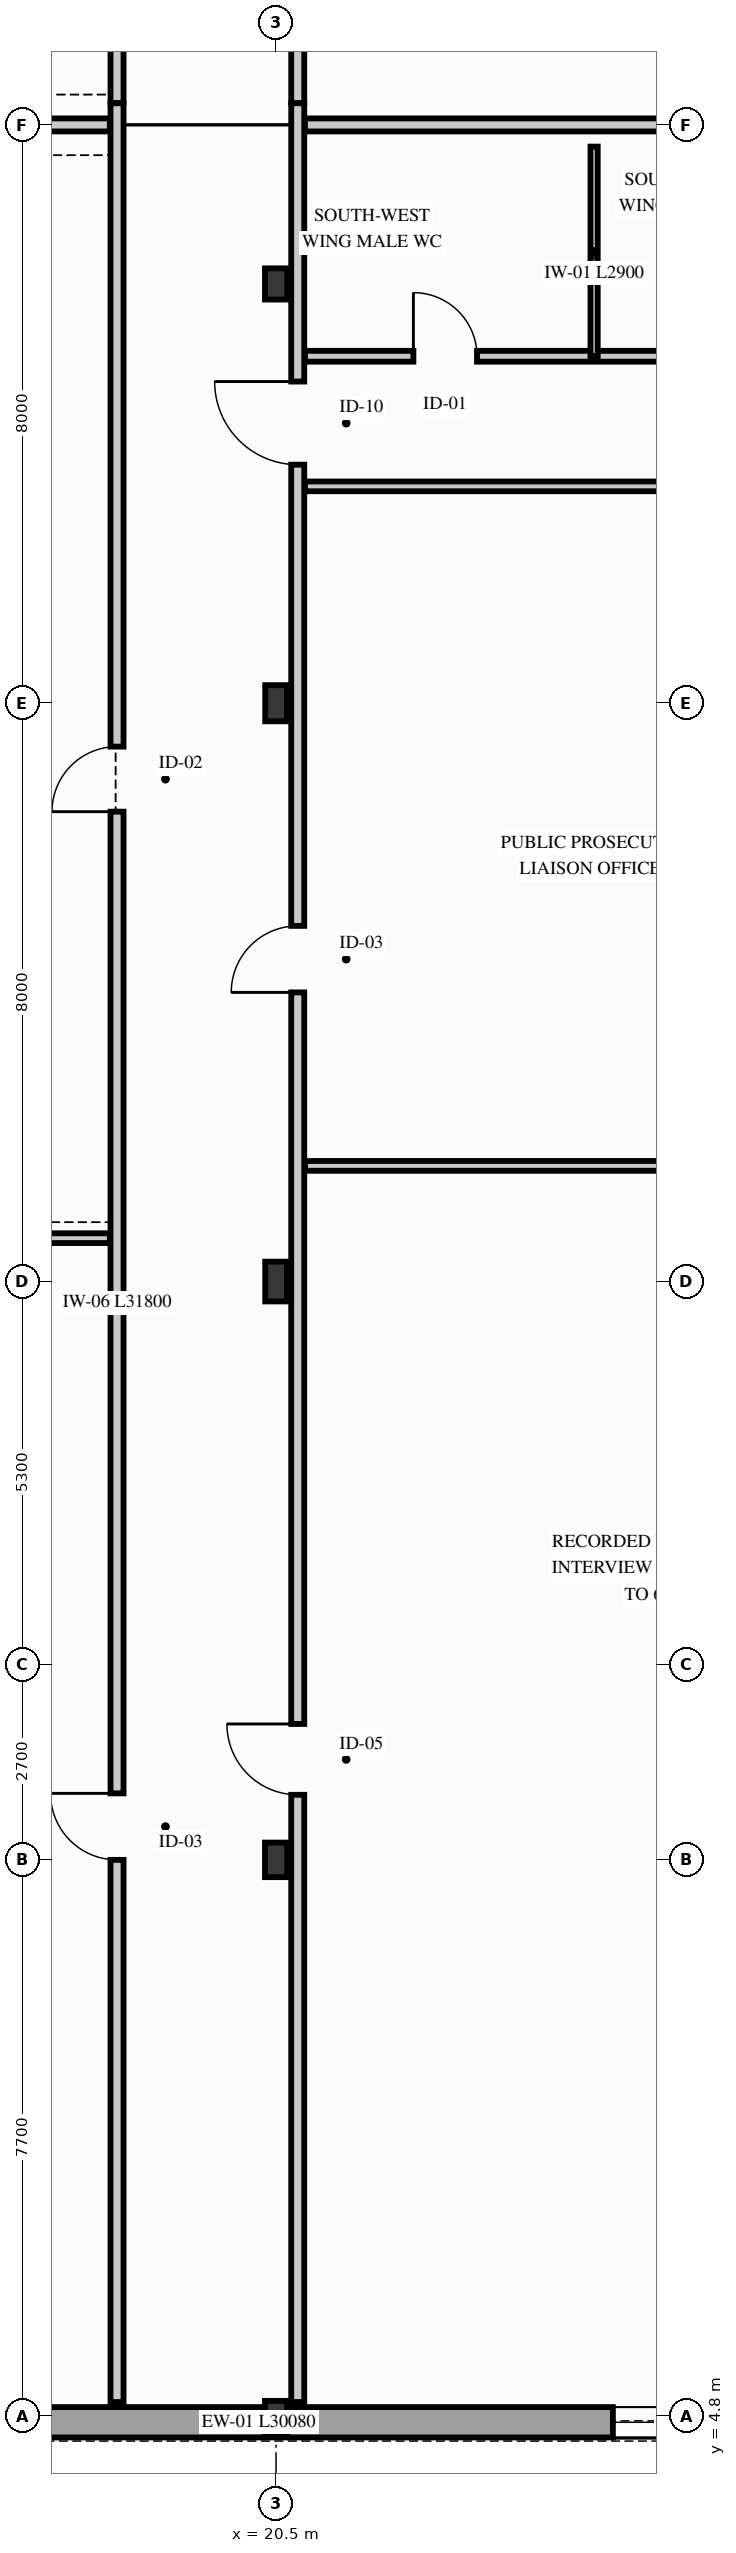
"""IFC4 building model, lengths in metres.
Left out: names, types, materials, properties, quantities, classifications, styles, units other than length and angle.
Written with IfcOpenShell. Run it as: python <this file> out.ifc"""

import sys

from ifc_helpers import new_model, si_unit, direction, frame, frame_2d, origin, origin_2d, place, context, subcontext, project, spatial, rectangle, i_section, extrude, element, fill, save


model = new_model("IFC4")
c1 = context("Model", 3, precision=1e-05, world=origin(), true_north=direction((0.0, 1.0)))
c2 = subcontext(c1, "Body", "Model", "MODEL_VIEW")
j1 = project(units=[si_unit("LENGTHUNIT", "METRE"), si_unit("PLANEANGLEUNIT", "RADIAN")], contexts=[c1])
p1 = place(None, origin())
s1 = spatial("IfcSite", under=j1, at=p1, CompositionType="ELEMENT")
p2 = place(p1, origin())
s2 = spatial("IfcBuilding", under=s1, at=p2, CompositionType="ELEMENT")
p3 = place(p2, frame((0.0, 0.0, 9.3)))
s3 = spatial("IfcBuildingStorey", under=s2, at=p3, CompositionType="ELEMENT", Elevation=9.3)
p4 = place(p3, frame((20.5, 4.8, 0.0), z_axis=(0.0, 0.0, 1.0), x_axis=(1.0, 0.0, 0.0)))
e1 = element("IfcColumn", 1, at=p4, inside=s3, PredefinedType="COLUMN", context=c2, shape_type="SweptSolid", body=[
    extrude(i_section(OverallWidth=0.307, OverallDepth=0.432, WebThickness=0.021, FlangeThickness=0.04, FilletRadius=0.027, at=origin_2d()), origin(), (0.0, 0.0, 1.0), 4.2),
])
p5 = place(p3, frame((20.5, 12.5, 0.0), z_axis=(0.0, 0.0, 1.0), x_axis=(1.0, 0.0, 0.0)))
e2 = element("IfcColumn", 2, at=p5, inside=s3, PredefinedType="COLUMN", context=c2, shape_type="SweptSolid", body=[
    extrude(i_section(OverallWidth=0.307, OverallDepth=0.478, WebThickness=0.021, FlangeThickness=0.04, FilletRadius=0.027, at=origin_2d()), origin(), (0.0, 0.0, 1.0), 4.2),
])
p6 = place(p3, frame((20.5, 20.5, 0.0), z_axis=(0.0, 0.0, 1.0), x_axis=(1.0, 0.0, 0.0)))
e3 = element("IfcColumn", 3, at=p6, inside=s3, PredefinedType="COLUMN", context=c2, shape_type="SweptSolid", body=[
    extrude(i_section(OverallWidth=0.3, OverallDepth=0.55, WebThickness=0.015, FlangeThickness=0.029, FilletRadius=0.027, at=origin_2d()), origin(), (0.0, 0.0, 1.0), 4.2),
])
p7 = place(p3, frame((20.5, 28.5, 0.0), z_axis=(0.0, 0.0, 1.0), x_axis=(1.0, 0.0, 0.0)))
e4 = element("IfcColumn", 4, at=p7, inside=s3, PredefinedType="COLUMN", context=c2, shape_type="SweptSolid", body=[
    extrude(i_section(OverallWidth=0.3, OverallDepth=0.5, WebThickness=0.014, FlangeThickness=0.028, FilletRadius=0.027, at=origin_2d()), origin(), (0.0, 0.0, 1.0), 4.2),
])
p8 = place(p3, frame((20.5, 34.3, 0.0), z_axis=(0.0, 0.0, 1.0), x_axis=(1.0, 0.0, 0.0)))
e5 = element("IfcColumn", 5, at=p8, inside=s3, PredefinedType="COLUMN", context=c2, shape_type="SweptSolid", body=[
    extrude(i_section(OverallWidth=0.307, OverallDepth=0.432, WebThickness=0.021, FlangeThickness=0.04, FilletRadius=0.027, at=origin_2d()), origin(), (0.0, 0.0, 1.0), 4.2),
])
p9 = place(p3, frame((4.51, 4.72, 0.0), z_axis=(0.0, 0.0, 1.0), x_axis=(1.0, 0.0, 0.0)))
e6 = element("IfcWall", 6, at=p9, inside=s3, PredefinedType="SOLIDWALL", context=c2, shape_type="SweptSolid", body=[
    extrude(rectangle(XDim=30.08, YDim=0.42, at=frame_2d((15.04, 0.0))), origin(), (0.0, 0.0, 1.0), 3.62),
])
p10 = place(p9, frame((1.65, 0.0, 0.85)))
e7 = element("IfcOpeningElement", 7, at=p10, cuts=e6, PredefinedType="OPENING", context=c2, shape_type="SweptSolid", body=[
    extrude(rectangle(XDim=1.3, YDim=2.15, at=frame_2d((0.65, 1.075))), frame((0.0, 0.22, 0.0), z_axis=(0.0, -1.0, 0.0), x_axis=(1.0, 0.0, 0.0)), (0.0, 0.0, 1.0), 0.44),
])
p11 = place(p9, frame((5.45, 0.0, 0.84)))
e8 = element("IfcOpeningElement", 8, at=p11, cuts=e6, PredefinedType="OPENING", context=c2, shape_type="SweptSolid", body=[
    extrude(rectangle(XDim=1.5, YDim=2.3, at=frame_2d((0.75, 1.15))), frame((0.0, 0.22, 0.0), z_axis=(0.0, -1.0, 0.0), x_axis=(1.0, 0.0, 0.0)), (0.0, 0.0, 1.0), 0.44),
])
p12 = place(p9, frame((9.25, 0.0, 0.74)))
e9 = element("IfcOpeningElement", 9, at=p12, cuts=e6, PredefinedType="OPENING", context=c2, shape_type="SweptSolid", body=[
    extrude(rectangle(XDim=1.6, YDim=2.4, at=frame_2d((0.8, 1.2))), frame((0.0, 0.22, 0.0), z_axis=(0.0, -1.0, 0.0), x_axis=(1.0, 0.0, 0.0)), (0.0, 0.0, 1.0), 0.44),
])
p13 = place(p9, frame((20.65, 0.0, 0.74)))
e10 = element("IfcOpeningElement", 10, at=p13, cuts=e6, PredefinedType="OPENING", context=c2, shape_type="SweptSolid", body=[
    extrude(rectangle(XDim=1.8, YDim=2.4, at=frame_2d((0.9, 1.2))), frame((0.0, 0.22, 0.0), z_axis=(0.0, -1.0, 0.0), x_axis=(1.0, 0.0, 0.0)), (0.0, 0.0, 1.0), 0.44),
])
p14 = place(p9, frame((24.45, 0.0, 0.69)))
e11 = element("IfcOpeningElement", 11, at=p14, cuts=e6, PredefinedType="OPENING", context=c2, shape_type="SweptSolid", body=[
    extrude(rectangle(XDim=1.9, YDim=2.45, at=frame_2d((0.95, 1.225))), frame((0.0, 0.22, 0.0), z_axis=(0.0, -1.0, 0.0), x_axis=(1.0, 0.0, 0.0)), (0.0, 0.0, 1.0), 0.44),
])
p15 = place(p3, frame((18.3, 36.8, 0.0), z_axis=(0.0, 0.0, 1.0), x_axis=(0.0, 1.0, 0.0)))
e12 = element("IfcWall", 12, at=p15, inside=s3, PredefinedType="PARTITIONING", context=c2, shape_type="SweptSolid", body=[
    extrude(rectangle(XDim=35.95, YDim=0.18, at=frame_2d((17.975, 0.0))), origin(), (0.0, 0.0, 1.0), 3.678),
])
p16 = place(p15, frame((7.0, 0.0, 0.0)))
e13 = element("IfcOpeningElement", 13, at=p16, cuts=e12, PredefinedType="OPENING", context=c2, shape_type="SweptSolid", body=[
    extrude(rectangle(XDim=1.02, YDim=2.18, at=frame_2d((0.51, 1.09))), frame((0.0, 0.1, 0.0), z_axis=(0.0, -1.0, 0.0), x_axis=(1.0, 0.0, 0.0)), (0.0, 0.0, 1.0), 0.2),
])
p17 = place(p15, frame((22.0, 0.0, 0.0)))
e14 = element("IfcOpeningElement", 14, at=p17, cuts=e12, PredefinedType="OPENING", context=c2, shape_type="SweptSolid", body=[
    extrude(rectangle(XDim=1.05, YDim=2.2, at=frame_2d((0.525, 1.1))), frame((0.0, 0.1, 0.0), z_axis=(0.0, -1.0, 0.0), x_axis=(1.0, 0.0, 0.0)), (0.0, 0.0, 1.0), 0.2),
])
p18 = place(p3, frame((20.8, 36.8, 0.0), z_axis=(0.0, 0.0, 1.0), x_axis=(0.0, 1.0, 0.0)))
e15 = element("IfcWall", 15, at=p18, inside=s3, PredefinedType="PARTITIONING", context=c2, shape_type="SweptSolid", body=[
    extrude(rectangle(XDim=38.05, YDim=0.18, at=frame_2d((19.025, 0.0))), origin(), (0.0, 0.0, 1.0), 3.678),
])
p19 = place(p18, frame((5.65, 0.0, 0.0)))
e16 = element("IfcOpeningElement", 16, at=p19, cuts=e15, PredefinedType="OPENING", context=c2, shape_type="SweptSolid", body=[
    extrude(rectangle(XDim=1.08, YDim=2.22, at=frame_2d((0.54, 1.11))), frame((0.0, 0.1, 0.0), z_axis=(0.0, -1.0, 0.0), x_axis=(1.0, 0.0, 0.0)), (0.0, 0.0, 1.0), 0.2),
])
p20 = place(p18, frame((20.0, 0.0, 0.0)))
e17 = element("IfcOpeningElement", 17, at=p20, cuts=e15, PredefinedType="OPENING", context=c2, shape_type="SweptSolid", body=[
    extrude(rectangle(XDim=1.05, YDim=2.2, at=frame_2d((0.525, 1.1))), frame((0.0, 0.1, 0.0), z_axis=(0.0, -1.0, 0.0), x_axis=(1.0, 0.0, 0.0)), (0.0, 0.0, 1.0), 0.2),
])
p21 = place(p18, frame((32.9, 0.0, 0.0)))
e18 = element("IfcOpeningElement", 18, at=p21, cuts=e15, PredefinedType="OPENING", context=c2, shape_type="SweptSolid", body=[
    extrude(rectangle(XDim=1.02, YDim=2.18, at=frame_2d((0.51, 1.09))), frame((0.0, 0.1, 0.0), z_axis=(0.0, -1.0, 0.0), x_axis=(1.0, 0.0, 0.0)), (0.0, 0.0, 1.0), 0.2),
])
p22 = place(p3, frame((18.3, 5.0, 0.0), z_axis=(0.0, 0.0, 1.0), x_axis=(0.0, 1.0, 0.0)))
e19 = element("IfcWall", 19, at=p22, inside=s3, PredefinedType="PARTITIONING", context=c2, shape_type="SweptSolid", body=[
    extrude(rectangle(XDim=31.8, YDim=0.18, at=frame_2d((15.9, 0.0))), origin(), (0.0, 0.0, 1.0), 3.698),
])
p23 = place(p22, frame((7.5, 0.0, 0.0)))
e20 = element("IfcOpeningElement", 20, at=p23, cuts=e19, PredefinedType="OPENING", context=c2, shape_type="SweptSolid", body=[
    extrude(rectangle(XDim=0.92, YDim=2.12, at=frame_2d((0.46, 1.06))), frame((0.0, 0.1, 0.0), z_axis=(0.0, -1.0, 0.0), x_axis=(1.0, 0.0, 0.0)), (0.0, 0.0, 1.0), 0.2),
])
p24 = place(p22, frame((22.0, 0.0, 0.0)))
e21 = element("IfcOpeningElement", 21, at=p24, cuts=e19, PredefinedType="OPENING", context=c2, shape_type="SweptSolid", body=[
    extrude(rectangle(XDim=0.9, YDim=2.1, at=frame_2d((0.45, 1.05))), frame((0.0, 0.1, 0.0), z_axis=(0.0, -1.0, 0.0), x_axis=(1.0, 0.0, 0.0)), (0.0, 0.0, 1.0), 0.2),
])
p25 = place(p3, frame((20.8, 5.0, 0.0), z_axis=(0.0, 0.0, 1.0), x_axis=(0.0, 1.0, 0.0)))
e22 = element("IfcWall", 22, at=p25, inside=s3, PredefinedType="PARTITIONING", context=c2, shape_type="SweptSolid", body=[
    extrude(rectangle(XDim=31.8, YDim=0.18, at=frame_2d((15.9, 0.0))), origin(), (0.0, 0.0, 1.0), 3.618),
])
p26 = place(p25, frame((8.4, 0.0, 0.0)))
e23 = element("IfcOpeningElement", 23, at=p26, cuts=e22, PredefinedType="OPENING", context=c2, shape_type="SweptSolid", body=[
    extrude(rectangle(XDim=0.98, YDim=2.16, at=frame_2d((0.49, 1.08))), frame((0.0, 0.1, 0.0), z_axis=(0.0, -1.0, 0.0), x_axis=(1.0, 0.0, 0.0)), (0.0, 0.0, 1.0), 0.2),
])
p27 = place(p25, frame((19.5, 0.0, 0.0)))
e24 = element("IfcOpeningElement", 24, at=p27, cuts=e22, PredefinedType="OPENING", context=c2, shape_type="SweptSolid", body=[
    extrude(rectangle(XDim=0.92, YDim=2.12, at=frame_2d((0.46, 1.06))), frame((0.0, 0.1, 0.0), z_axis=(0.0, -1.0, 0.0), x_axis=(1.0, 0.0, 0.0)), (0.0, 0.0, 1.0), 0.2),
])
p28 = place(p25, frame((26.8, 0.0, 0.0)))
e25 = element("IfcOpeningElement", 25, at=p28, cuts=e22, PredefinedType="OPENING", context=c2, shape_type="SweptSolid", body=[
    extrude(rectangle(XDim=1.15, YDim=2.2, at=frame_2d((0.575, 1.1))), frame((0.0, 0.1, 0.0), z_axis=(0.0, -1.0, 0.0), x_axis=(1.0, 0.0, 0.0)), (0.0, 0.0, 1.0), 0.2),
])
p29 = place(p3, frame((5.0, 36.5, 0.0), z_axis=(0.0, 0.0, 1.0), x_axis=(1.0, 0.0, 0.0)))
e26 = element("IfcWall", 26, at=p29, inside=s3, PredefinedType="PARTITIONING", context=c2, shape_type="SweptSolid", body=[
    extrude(rectangle(XDim=13.2, YDim=0.18, at=frame_2d((6.6, 0.0))), origin(), (0.0, 0.0, 1.0), 3.92),
])
p30 = place(p3, frame((20.9, 36.5, 0.0), z_axis=(0.0, 0.0, 1.0), x_axis=(1.0, 0.0, 0.0)))
e27 = element("IfcWall", 27, at=p30, inside=s3, PredefinedType="PARTITIONING", context=c2, shape_type="SweptSolid", body=[
    extrude(rectangle(XDim=7.15, YDim=0.18, at=frame_2d((3.575, 0.0))), origin(), (0.0, 0.0, 1.0), 3.92),
])
p31 = place(p3, frame((5.0, 21.1, 0.0), z_axis=(0.0, 0.0, 1.0), x_axis=(1.0, 0.0, 0.0)))
e28 = element("IfcWall", 28, at=p31, inside=s3, PredefinedType="PARTITIONING", context=c2, shape_type="SweptSolid", body=[
    extrude(rectangle(XDim=13.2, YDim=0.135, at=frame_2d((6.6, 0.0))), origin(), (0.0, 0.0, 1.0), 3.598),
])
p32 = place(p3, frame((20.9, 22.1, 0.0), z_axis=(0.0, 0.0, 1.0), x_axis=(1.0, 0.0, 0.0)))
e29 = element("IfcWall", 29, at=p32, inside=s3, PredefinedType="PARTITIONING", context=c2, shape_type="SweptSolid", body=[
    extrude(rectangle(XDim=13.25, YDim=0.135, at=frame_2d((6.625, 0.0))), origin(), (0.0, 0.0, 1.0), 3.488),
])
p33 = place(p3, frame((20.9, 33.3, 0.0), z_axis=(0.0, 0.0, 1.0), x_axis=(1.0, 0.0, 0.0)))
e30 = element("IfcWall", 30, at=p33, inside=s3, PredefinedType="PARTITIONING", context=c2, shape_type="SweptSolid", body=[
    extrude(rectangle(XDim=13.25, YDim=0.15, at=frame_2d((6.625, 0.0))), origin(), (0.0, 0.0, 1.0), 3.488),
])
p34 = place(p33, frame((1.5, 0.0, 0.0)))
e31 = element("IfcOpeningElement", 31, at=p34, cuts=e30, PredefinedType="OPENING", context=c2, shape_type="SweptSolid", body=[
    extrude(rectangle(XDim=0.88, YDim=2.1, at=frame_2d((0.44, 1.05))), frame((0.0, 0.085, 0.0), z_axis=(0.0, -1.0, 0.0), x_axis=(1.0, 0.0, 0.0)), (0.0, 0.0, 1.0), 0.17),
])
p35 = place(p33, frame((5.8, 0.0, 0.0)))
e32 = element("IfcOpeningElement", 32, at=p35, cuts=e30, PredefinedType="OPENING", context=c2, shape_type="SweptSolid", body=[
    extrude(rectangle(XDim=0.9, YDim=2.1, at=frame_2d((0.45, 1.05))), frame((0.0, 0.085, 0.0), z_axis=(0.0, -1.0, 0.0), x_axis=(1.0, 0.0, 0.0)), (0.0, 0.0, 1.0), 0.17),
])
p36 = place(p33, frame((10.2, 0.0, 0.0)))
e33 = element("IfcOpeningElement", 33, at=p36, cuts=e30, PredefinedType="OPENING", context=c2, shape_type="SweptSolid", body=[
    extrude(rectangle(XDim=0.95, YDim=2.15, at=frame_2d((0.475, 1.075))), frame((0.0, 0.085, 0.0), z_axis=(0.0, -1.0, 0.0), x_axis=(1.0, 0.0, 0.0)), (0.0, 0.0, 1.0), 0.17),
])
p37 = place(p3, frame((20.9, 31.5, 0.0), z_axis=(0.0, 0.0, 1.0), x_axis=(1.0, 0.0, 0.0)))
e34 = element("IfcWall", 34, at=p37, inside=s3, PredefinedType="PARTITIONING", context=c2, shape_type="SweptSolid", body=[
    extrude(rectangle(XDim=13.25, YDim=0.135, at=frame_2d((6.625, 0.0))), origin(), (0.0, 0.0, 1.0), 3.488),
])
p38 = place(p3, frame((24.9, 33.3, 0.0), z_axis=(0.0, 0.0, 1.0), x_axis=(0.0, 1.0, 0.0)))
e35 = element("IfcWall", 35, at=p38, inside=s3, PredefinedType="PARTITIONING", context=c2, shape_type="SweptSolid", body=[
    extrude(rectangle(XDim=2.9, YDim=0.1, at=frame_2d((1.45, 0.0))), origin(), (0.0, 0.0, 1.0), 3.92),
])
p39 = place(p13, origin())
e36 = element("IfcWindow", 36, at=p39, inside=s3, PartitioningType="SINGLE_PANEL", PredefinedType="WINDOW", context=c2, shape_type="SweptSolid", body=[
    extrude(rectangle(XDim=1.8, YDim=2.4, at=frame_2d((0.9, 1.2))), frame((0.0, 0.03, 0.0), z_axis=(0.0, -1.0, 0.0), x_axis=(1.0, 0.0, 0.0)), (0.0, 0.0, 1.0), 0.06),
])
fill(e10, e36)
p40 = place(p23, origin())
e37 = element("IfcDoor", 37, at=p40, inside=s3, OperationType="SINGLE_SWING_RIGHT", PredefinedType="DOOR", context=c2, shape_type="SweptSolid", body=[
    extrude(rectangle(XDim=0.92, YDim=2.12, at=frame_2d((0.46, 1.06))), frame((0.0, 0.025, 0.0), z_axis=(0.0, -1.0, 0.0), x_axis=(1.0, 0.0, 0.0)), (0.0, 0.0, 1.0), 0.05),
])
fill(e20, e37)
p41 = place(p24, origin())
e38 = element("IfcDoor", 38, at=p41, inside=s3, OperationType="SINGLE_SWING_LEFT", PredefinedType="DOOR", context=c2, shape_type="SweptSolid", body=[
    extrude(rectangle(XDim=0.9, YDim=2.1, at=frame_2d((0.45, 1.05))), frame((0.0, 0.025, 0.0), z_axis=(0.0, -1.0, 0.0), x_axis=(1.0, 0.0, 0.0)), (0.0, 0.0, 1.0), 0.05),
])
fill(e21, e38)
p42 = place(p26, origin())
e39 = element("IfcDoor", 39, at=p42, inside=s3, OperationType="SINGLE_SWING_RIGHT", PredefinedType="DOOR", context=c2, shape_type="SweptSolid", body=[
    extrude(rectangle(XDim=0.98, YDim=2.16, at=frame_2d((0.49, 1.08))), frame((0.0, 0.025, 0.0), z_axis=(0.0, -1.0, 0.0), x_axis=(1.0, 0.0, 0.0)), (0.0, 0.0, 1.0), 0.05),
])
fill(e23, e39)
p43 = place(p27, origin())
e40 = element("IfcDoor", 40, at=p43, inside=s3, OperationType="SINGLE_SWING_LEFT", PredefinedType="DOOR", context=c2, shape_type="SweptSolid", body=[
    extrude(rectangle(XDim=0.92, YDim=2.12, at=frame_2d((0.46, 1.06))), frame((0.0, 0.025, 0.0), z_axis=(0.0, -1.0, 0.0), x_axis=(1.0, 0.0, 0.0)), (0.0, 0.0, 1.0), 0.05),
])
fill(e24, e40)
p44 = place(p28, origin())
e41 = element("IfcDoor", 41, at=p44, inside=s3, OperationType="SINGLE_SWING_RIGHT", PredefinedType="DOOR", context=c2, shape_type="SweptSolid", body=[
    extrude(rectangle(XDim=1.15, YDim=2.2, at=frame_2d((0.575, 1.1))), frame((0.0, 0.025, 0.0), z_axis=(0.0, -1.0, 0.0), x_axis=(1.0, 0.0, 0.0)), (0.0, 0.0, 1.0), 0.05),
])
fill(e25, e41)
p45 = place(p34, origin())
e42 = element("IfcDoor", 42, at=p45, inside=s3, OperationType="SINGLE_SWING_LEFT", PredefinedType="DOOR", context=c2, shape_type="SweptSolid", body=[
    extrude(rectangle(XDim=0.88, YDim=2.1, at=frame_2d((0.44, 1.05))), frame((0.0, 0.025, 0.0), z_axis=(0.0, -1.0, 0.0), x_axis=(1.0, 0.0, 0.0)), (0.0, 0.0, 1.0), 0.05),
])
fill(e31, e42)
save(model, sys.argv[1])
